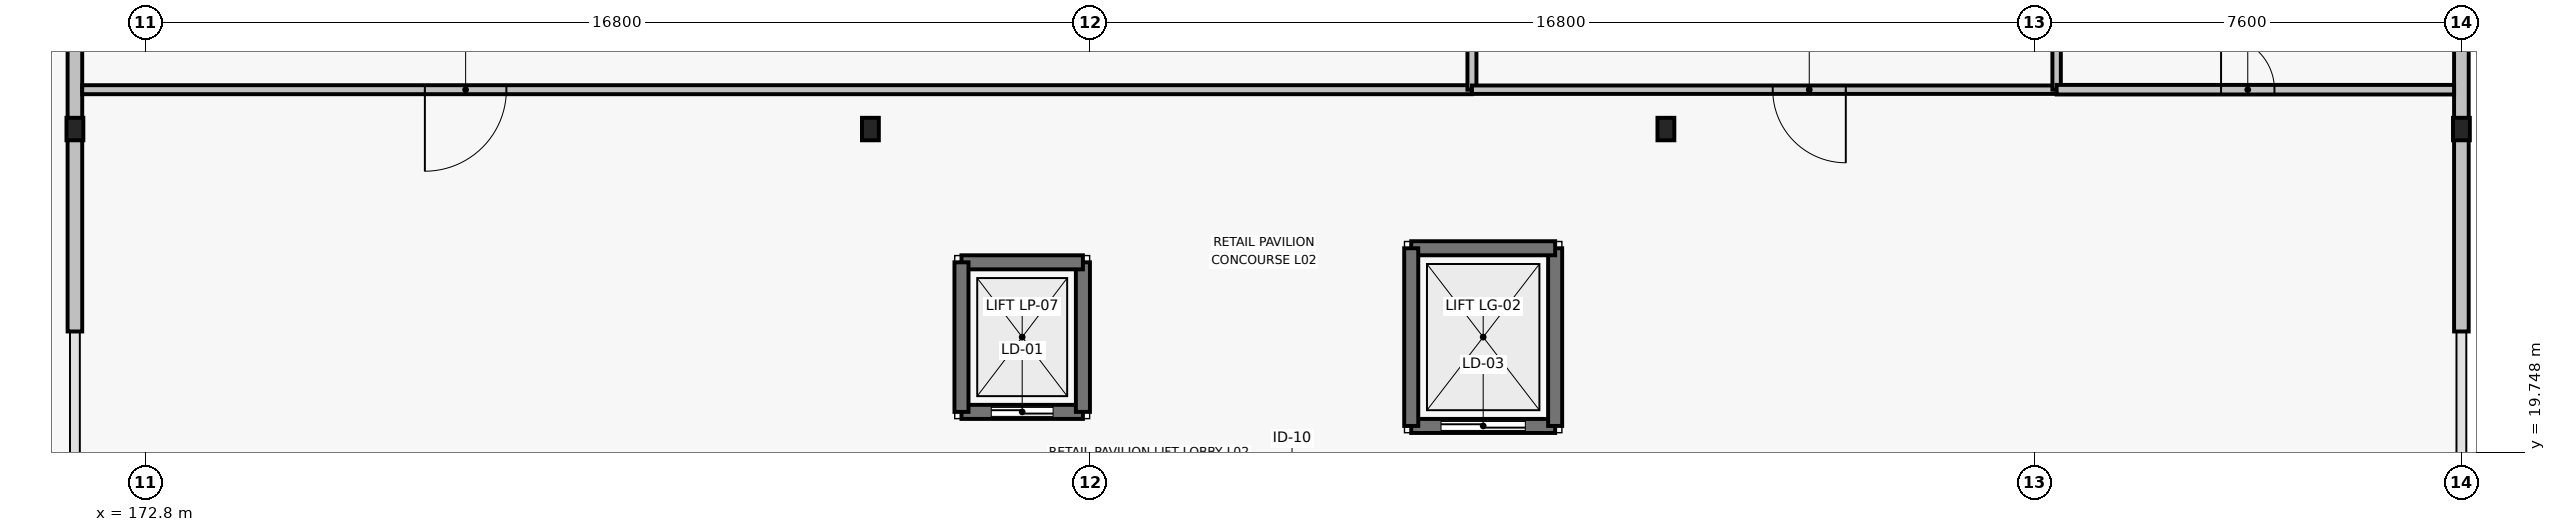
"""IFC4 building model, lengths in metres.
Left out: names, types, materials, properties, quantities, classifications, styles, units other than length and angle.
Written with IfcOpenShell. Run it as: python <this file> out.ifc"""

import sys

from ifc_helpers import new_model, si_unit, direction, frame, frame_2d, origin, origin_2d, place, context, subcontext, project, spatial, polyline, rectangle, i_section, outline, extrude, element, fill, save


model = new_model("IFC4")
c1 = context("Model", 3, precision=1e-05, world=origin(), true_north=direction((0.0, 1.0)))
c2 = subcontext(c1, "Body", "Model", "MODEL_VIEW")
j1 = project(units=[si_unit("LENGTHUNIT", "METRE"), si_unit("PLANEANGLEUNIT", "RADIAN")], contexts=[c1])
p1 = place(None, origin())
s1 = spatial("IfcSite", under=j1, at=p1, CompositionType="ELEMENT")
p2 = place(p1, origin())
s2 = spatial("IfcBuilding", under=s1, at=p2, CompositionType="ELEMENT")
p3 = place(p2, frame((0.0, 0.0, 10.8)))
s3 = spatial("IfcBuildingStorey", under=s2, at=p3, CompositionType="ELEMENT", Elevation=10.8)
for number, where, z_axis, x_axis in (
    (1, (171.55, 25.5, 0.0), (0.0, 0.0, 1.0), (1.0, 0.0, 0.0)),
    (2, (185.7, 25.5, 0.0), (0.0, 0.0, 1.0), (1.0, 0.0, 0.0)),
    (3, (199.85, 25.5, 0.0), (0.0, 0.0, 1.0), (1.0, 0.0, 0.0)),
    (4, (214.0, 25.5, 0.0), (0.0, 0.0, 1.0), (1.0, 0.0, 0.0)),
):
    element("IfcColumn", number, at=place(p3, frame(where, z_axis=z_axis, x_axis=x_axis)), inside=s3, PredefinedType="COLUMN", context=c2, shape_type="SweptSolid", body=[
        extrude(i_section(OverallWidth=0.3, OverallDepth=0.4, WebThickness=0.013, FlangeThickness=0.024, FilletRadius=0.027, at=origin_2d()), origin(), (0.0, 0.0, 1.0), 4.915),
    ])
p4 = place(p3, frame((171.55, 21.9, 0.0), z_axis=(0.0, 0.0, 1.0), x_axis=(0.0, 1.0, 0.0)))
e5 = element("IfcWall", 5, at=p4, inside=s3, PredefinedType="STANDARD", context=c2, shape_type="SweptSolid", body=[
    extrude(outline(polyline([(0.0, 0.0), (3.6, 0.0), (3.6, 4.723), (0.0, 4.053), (0.0, 0.0)])), frame((0.0, 0.13, 0.0), z_axis=(0.0, -1.0, 0.0), x_axis=(1.0, 0.0, 0.0)), (0.0, 0.0, 1.0), 0.26),
])
p5 = place(p3, frame((171.55, 25.5, 0.0), z_axis=(0.0, 0.0, 1.0), x_axis=(0.0, 1.0, 0.0)))
e6 = element("IfcWall", 6, at=p5, inside=s3, PredefinedType="STANDARD", context=c2, shape_type="SweptSolid", body=[
    extrude(outline(polyline([(0.0, 0.0), (12.37, 0.0), (12.37, 6.945), (0.0, 4.723), (0.0, 0.0)])), frame((0.0, 0.13, 0.0), z_axis=(0.0, -1.0, 0.0), x_axis=(1.0, 0.0, 0.0)), (0.0, 0.0, 1.0), 0.26),
])
p6 = place(p5, frame((5.8, 0.0, 0.0)))
e7 = element("IfcOpeningElement", 7, at=p6, cuts=e6, PredefinedType="OPENING", context=c2, shape_type="SweptSolid", body=[
    extrude(rectangle(XDim=1.8, YDim=2.35, at=frame_2d((0.9, 1.175))), frame((0.0, 0.14, 0.0), z_axis=(0.0, -1.0, 0.0), x_axis=(1.0, 0.0, 0.0)), (0.0, 0.0, 1.0), 0.28),
])
p7 = place(p5, frame((2.2, 0.0, 0.7)))
e8 = element("IfcOpeningElement", 8, at=p7, cuts=e6, PredefinedType="OPENING", context=c2, shape_type="SweptSolid", body=[
    extrude(rectangle(XDim=1.6, YDim=1.5, at=frame_2d((0.8, 0.75))), frame((0.0, 0.14, 0.0), z_axis=(0.0, -1.0, 0.0), x_axis=(1.0, 0.0, 0.0)), (0.0, 0.0, 1.0), 0.28),
])
p8 = place(p3, frame((214.0, 21.9, 0.0), z_axis=(0.0, 0.0, 1.0), x_axis=(0.0, 1.0, 0.0)))
e9 = element("IfcWall", 9, at=p8, inside=s3, PredefinedType="STANDARD", context=c2, shape_type="SweptSolid", body=[
    extrude(outline(polyline([(0.0, 0.0), (3.6, 0.0), (3.6, 4.723), (0.0, 4.053), (0.0, 0.0)])), frame((0.0, 0.13, 0.0), z_axis=(0.0, -1.0, 0.0), x_axis=(1.0, 0.0, 0.0)), (0.0, 0.0, 1.0), 0.26),
])
p9 = place(p3, frame((214.0, 25.5, 0.0), z_axis=(0.0, 0.0, 1.0), x_axis=(0.0, 1.0, 0.0)))
e10 = element("IfcWall", 10, at=p9, inside=s3, PredefinedType="STANDARD", context=c2, shape_type="SweptSolid", body=[
    extrude(outline(polyline([(0.0, 0.0), (3.6, 0.0), (3.6, 5.392), (0.0, 4.723), (0.0, 0.0)])), frame((0.0, 0.13, 0.0), z_axis=(0.0, -1.0, 0.0), x_axis=(1.0, 0.0, 0.0)), (0.0, 0.0, 1.0), 0.26),
])
p10 = place(p3, frame((187.32, 20.47, 0.0), z_axis=(0.0, 0.0, 1.0), x_axis=(1.0, 0.0, 0.0)))
e11 = element("IfcWall", 11, at=p10, inside=s3, PredefinedType="SHEAR", context=c2, shape_type="SweptSolid", body=[
    extrude(rectangle(XDim=2.16, YDim=0.25, at=frame_2d((1.08, 0.0))), origin(), (0.0, 0.0, 1.0), 3.05),
])
p11 = place(p10, frame((0.53, 0.0, 0.0)))
e12 = element("IfcOpeningElement", 12, at=p11, cuts=e11, PredefinedType="OPENING", context=c2, shape_type="SweptSolid", body=[
    extrude(rectangle(XDim=1.1, YDim=2.2, at=frame_2d((0.55, 1.1))), frame((0.0, 0.135, 0.0), z_axis=(0.0, -1.0, 0.0), x_axis=(1.0, 0.0, 0.0)), (0.0, 0.0, 1.0), 0.27),
])
p12 = place(p3, frame((189.48, 20.47, 0.0), z_axis=(0.0, 0.0, 1.0), x_axis=(0.0, 1.0, 0.0)))
e13 = element("IfcWall", 13, at=p12, inside=s3, PredefinedType="SHEAR", context=c2, shape_type="SweptSolid", body=[
    extrude(rectangle(XDim=2.66, YDim=0.25, at=frame_2d((1.33, 0.0))), origin(), (0.0, 0.0, 1.0), 3.05),
])
p13 = place(p3, frame((189.48, 23.13, 0.0), z_axis=(0.0, 0.0, 1.0), x_axis=(-1.0, 0.0, 0.0)))
e14 = element("IfcWall", 14, at=p13, inside=s3, PredefinedType="SHEAR", context=c2, shape_type="SweptSolid", body=[
    extrude(rectangle(XDim=2.16, YDim=0.25, at=frame_2d((1.08, 0.0))), origin(), (0.0, 0.0, 1.0), 3.05),
])
p14 = place(p3, frame((187.32, 23.13, 0.0), z_axis=(0.0, 0.0, 1.0), x_axis=(0.0, -1.0, 0.0)))
e15 = element("IfcWall", 15, at=p14, inside=s3, PredefinedType="SHEAR", context=c2, shape_type="SweptSolid", body=[
    extrude(rectangle(XDim=2.66, YDim=0.25, at=frame_2d((1.33, 0.0))), origin(), (0.0, 0.0, 1.0), 3.05),
])
p15 = place(p3, frame((195.32, 20.22, 0.0), z_axis=(0.0, 0.0, 1.0), x_axis=(1.0, 0.0, 0.0)))
e16 = element("IfcWall", 16, at=p15, inside=s3, PredefinedType="SHEAR", context=c2, shape_type="SweptSolid", body=[
    extrude(rectangle(XDim=2.56, YDim=0.25, at=frame_2d((1.28, 0.0))), origin(), (0.0, 0.0, 1.0), 3.05),
])
p16 = place(p15, frame((0.53, 0.0, 0.0)))
e17 = element("IfcOpeningElement", 17, at=p16, cuts=e16, PredefinedType="OPENING", context=c2, shape_type="SweptSolid", body=[
    extrude(rectangle(XDim=1.5, YDim=2.3, at=frame_2d((0.75, 1.15))), frame((0.0, 0.135, 0.0), z_axis=(0.0, -1.0, 0.0), x_axis=(1.0, 0.0, 0.0)), (0.0, 0.0, 1.0), 0.27),
])
p17 = place(p3, frame((197.88, 20.22, 0.0), z_axis=(0.0, 0.0, 1.0), x_axis=(0.0, 1.0, 0.0)))
e18 = element("IfcWall", 18, at=p17, inside=s3, PredefinedType="SHEAR", context=c2, shape_type="SweptSolid", body=[
    extrude(rectangle(XDim=3.16, YDim=0.25, at=frame_2d((1.58, 0.0))), origin(), (0.0, 0.0, 1.0), 3.05),
])
p18 = place(p3, frame((197.88, 23.38, 0.0), z_axis=(0.0, 0.0, 1.0), x_axis=(-1.0, 0.0, 0.0)))
e19 = element("IfcWall", 19, at=p18, inside=s3, PredefinedType="SHEAR", context=c2, shape_type="SweptSolid", body=[
    extrude(rectangle(XDim=2.56, YDim=0.25, at=frame_2d((1.28, 0.0))), origin(), (0.0, 0.0, 1.0), 3.05),
])
p19 = place(p3, frame((195.32, 23.38, 0.0), z_axis=(0.0, 0.0, 1.0), x_axis=(0.0, -1.0, 0.0)))
e20 = element("IfcWall", 20, at=p19, inside=s3, PredefinedType="SHEAR", context=c2, shape_type="SweptSolid", body=[
    extrude(rectangle(XDim=3.16, YDim=0.25, at=frame_2d((1.58, 0.0))), origin(), (0.0, 0.0, 1.0), 3.05),
])
p20 = place(p3, frame((171.68, 26.2, 0.0), z_axis=(0.0, 0.0, 1.0), x_axis=(1.0, 0.0, 0.0)))
e21 = element("IfcWall", 21, at=p20, inside=s3, PredefinedType="PARTITIONING", context=c2, shape_type="SweptSolid", body=[
    extrude(rectangle(XDim=24.72, YDim=0.16, at=frame_2d((12.36, 0.0))), origin(), (0.0, 0.0, 1.0), 4.62),
])
p21 = place(p20, frame((7.545, 0.0, 0.0), z_axis=(0.0, 0.0, 1.0), x_axis=(-1.0, 0.0, 0.0)))
e22 = element("IfcOpeningElement", 22, at=p21, cuts=e21, PredefinedType="OPENING", context=c2, shape_type="SweptSolid", body=[
    extrude(rectangle(XDim=1.45, YDim=2.25, at=frame_2d((0.725, 1.125))), frame((0.0, 0.09, 0.0), z_axis=(0.0, -1.0, 0.0), x_axis=(1.0, 0.0, 0.0)), (0.0, 0.0, 1.0), 0.18),
])
p22 = place(p3, frame((196.4, 26.2, 0.0), z_axis=(0.0, 0.0, 1.0), x_axis=(0.0, 1.0, 0.0)))
e23 = element("IfcWall", 23, at=p22, inside=s3, PredefinedType="PARTITIONING", context=c2, shape_type="SweptSolid", body=[
    extrude(outline(polyline([(0.0, 0.0), (11.67, 0.0), (11.67, 6.94), (0.0, 4.848), (0.0, 0.0)])), frame((0.0, 0.08, 0.0), z_axis=(0.0, -1.0, 0.0), x_axis=(1.0, 0.0, 0.0)), (0.0, 0.0, 1.0), 0.16),
])
p23 = place(p3, frame((196.4, 26.2, 0.0), z_axis=(0.0, 0.0, 1.0), x_axis=(1.0, 0.0, 0.0)))
e24 = element("IfcWall", 24, at=p23, inside=s3, PredefinedType="PARTITIONING", context=c2, shape_type="SweptSolid", body=[
    extrude(rectangle(XDim=10.4, YDim=0.15, at=frame_2d((5.2, 0.0))), origin(), (0.0, 0.0, 1.0), 4.62),
])
p24 = place(p23, frame((5.35, 0.0, 0.0)))
e25 = element("IfcOpeningElement", 25, at=p24, cuts=e24, PredefinedType="OPENING", context=c2, shape_type="SweptSolid", body=[
    extrude(rectangle(XDim=1.3, YDim=2.15, at=frame_2d((0.65, 1.075))), frame((0.0, 0.085, 0.0), z_axis=(0.0, -1.0, 0.0), x_axis=(1.0, 0.0, 0.0)), (0.0, 0.0, 1.0), 0.17),
])
p25 = place(p3, frame((206.8, 26.2, 0.0), z_axis=(0.0, 0.0, 1.0), x_axis=(0.0, 1.0, 0.0)))
e26 = element("IfcWall", 26, at=p25, inside=s3, PredefinedType="PARTITIONING", context=c2, shape_type="SweptSolid", body=[
    extrude(outline(polyline([(0.0, 0.0), (11.78, 0.0), (11.78, 6.94), (0.0, 4.848), (0.0, 0.0)])), frame((0.0, 0.075, 0.0), z_axis=(0.0, -1.0, 0.0), x_axis=(1.0, 0.0, 0.0)), (0.0, 0.0, 1.0), 0.15),
])
p26 = place(p3, frame((206.8, 26.2, 0.0), z_axis=(0.0, 0.0, 1.0), x_axis=(1.0, 0.0, 0.0)))
e27 = element("IfcWall", 27, at=p26, inside=s3, PredefinedType="PLUMBINGWALL", context=c2, shape_type="SweptSolid", body=[
    extrude(rectangle(XDim=7.07, YDim=0.17, at=frame_2d((3.535, 0.0))), origin(), (0.0, 0.0, 1.0), 4.62),
])
p27 = place(p26, frame((2.925, 0.0, 0.0)))
e28 = element("IfcOpeningElement", 28, at=p27, cuts=e27, PredefinedType="OPENING", context=c2, shape_type="SweptSolid", body=[
    extrude(rectangle(XDim=0.95, YDim=2.15, at=frame_2d((0.475, 1.075))), frame((0.0, 0.095, 0.0), z_axis=(0.0, -1.0, 0.0), x_axis=(1.0, 0.0, 0.0)), (0.0, 0.0, 1.0), 0.19),
])
p28 = place(p11, origin())
e29 = element("IfcDoor", 29, at=p28, inside=s3, OperationType="SLIDING_TO_LEFT", PredefinedType="DOOR", context=c2, shape_type="SweptSolid", body=[
    extrude(rectangle(XDim=1.1, YDim=2.2, at=frame_2d((0.55, 1.1))), frame((0.0, 0.025, 0.0), z_axis=(0.0, -1.0, 0.0), x_axis=(1.0, 0.0, 0.0)), (0.0, 0.0, 1.0), 0.05),
])
fill(e12, e29)
p29 = place(p16, origin())
e30 = element("IfcDoor", 30, at=p29, inside=s3, OperationType="SLIDING_TO_LEFT", PredefinedType="DOOR", context=c2, shape_type="SweptSolid", body=[
    extrude(rectangle(XDim=1.5, YDim=2.3, at=frame_2d((0.75, 1.15))), frame((0.0, 0.025, 0.0), z_axis=(0.0, -1.0, 0.0), x_axis=(1.0, 0.0, 0.0)), (0.0, 0.0, 1.0), 0.05),
])
fill(e17, e30)
p30 = place(p21, origin())
e31 = element("IfcDoor", 31, at=p30, inside=s3, OperationType="SINGLE_SWING_LEFT", PredefinedType="DOOR", context=c2, shape_type="SweptSolid", body=[
    extrude(rectangle(XDim=1.45, YDim=2.25, at=frame_2d((0.725, 1.125))), frame((0.0, 0.025, 0.0), z_axis=(0.0, -1.0, 0.0), x_axis=(1.0, 0.0, 0.0)), (0.0, 0.0, 1.0), 0.05),
])
fill(e22, e31)
p31 = place(p24, origin())
e32 = element("IfcDoor", 32, at=p31, inside=s3, OperationType="SINGLE_SWING_RIGHT", PredefinedType="DOOR", context=c2, shape_type="SweptSolid", body=[
    extrude(rectangle(XDim=1.3, YDim=2.15, at=frame_2d((0.65, 1.075))), frame((0.0, 0.025, 0.0), z_axis=(0.0, -1.0, 0.0), x_axis=(1.0, 0.0, 0.0)), (0.0, 0.0, 1.0), 0.05),
])
fill(e25, e32)
p32 = place(p27, origin())
e33 = element("IfcDoor", 33, at=p32, inside=s3, OperationType="SINGLE_SWING_LEFT", PredefinedType="DOOR", context=c2, shape_type="SweptSolid", body=[
    extrude(rectangle(XDim=0.95, YDim=2.15, at=frame_2d((0.475, 1.075))), frame((0.0, 0.025, 0.0), z_axis=(0.0, -1.0, 0.0), x_axis=(1.0, 0.0, 0.0)), (0.0, 0.0, 1.0), 0.05),
])
fill(e28, e33)
save(model, sys.argv[1])
